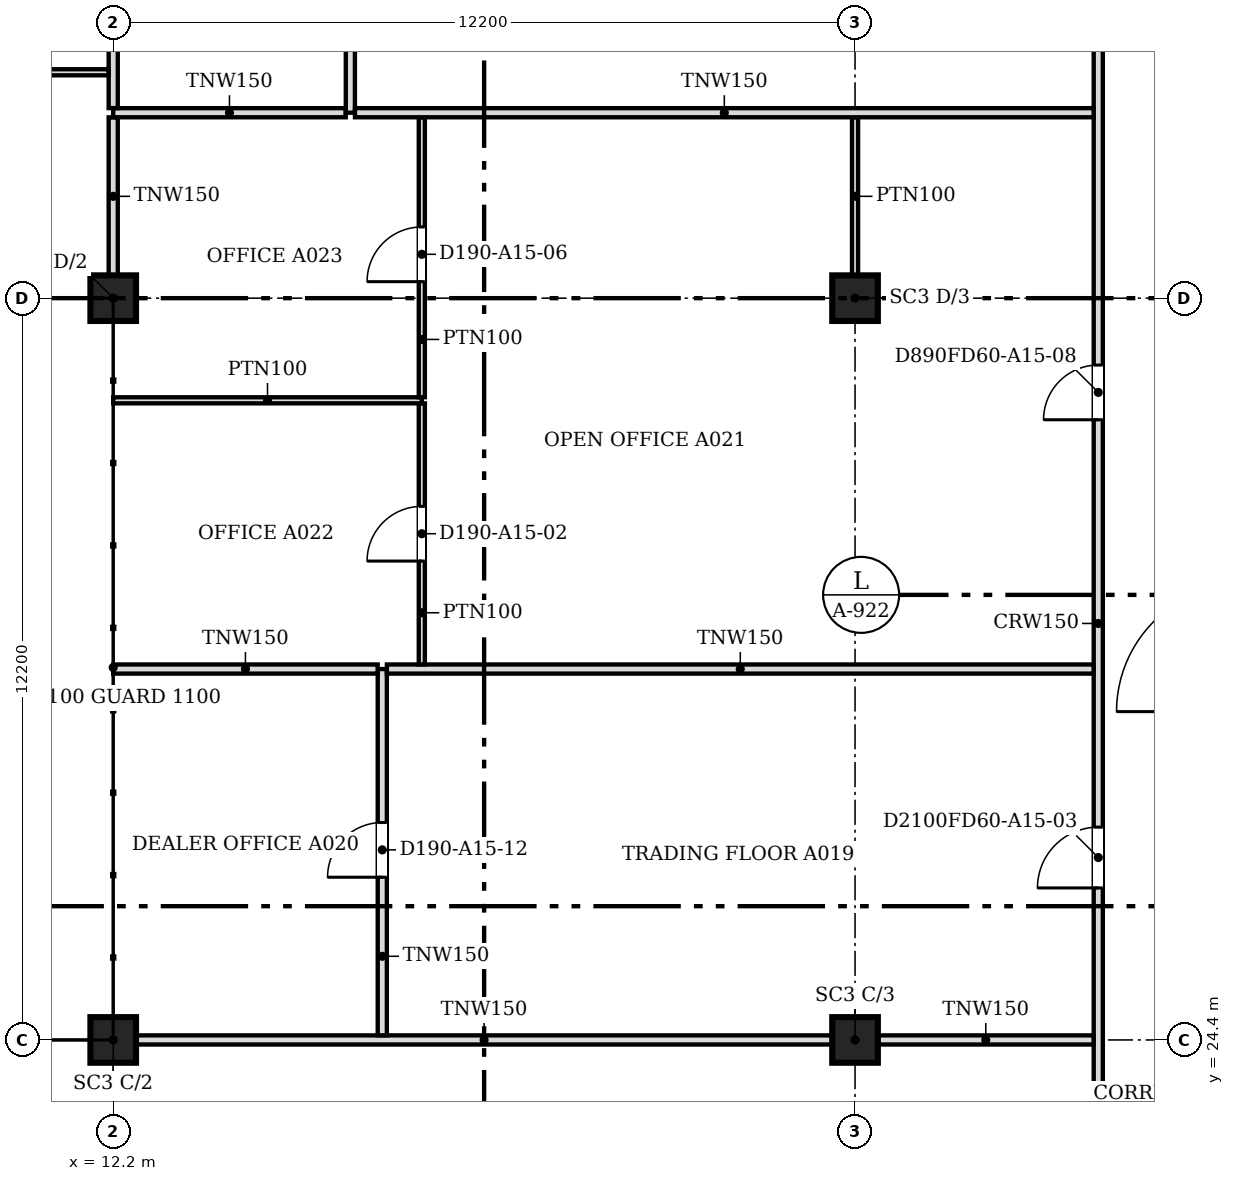
"""IFC4 building model, lengths in metres.
Left out: names, types, materials, properties, quantities, classifications, styles, units other than length and angle.
Written with IfcOpenShell. Run it as: python <this file> out.ifc"""

import sys

from ifc_helpers import new_model, si_unit, direction, frame, frame_2d, origin, origin_2d, place, context, subcontext, project, spatial, rectangle, extrude, source, transform, mapped, element, fill, save


model = new_model("IFC4")
c1 = context("Model", 3, precision=1e-05, world=origin(), true_north=direction((0.0, 1.0)))
c2 = subcontext(c1, "Body", "Model", "MODEL_VIEW")
j1 = project(units=[si_unit("LENGTHUNIT", "METRE"), si_unit("PLANEANGLEUNIT", "RADIAN")], contexts=[c1])
p1 = place(None, origin())
s1 = spatial("IfcSite", under=j1, at=p1, CompositionType="ELEMENT")
p2 = place(p1, origin())
s2 = spatial("IfcBuilding", under=s1, at=p2, CompositionType="ELEMENT")
p3 = place(p2, frame((0.0, 0.0, 166.8)))
s3 = spatial("IfcBuildingStorey", under=s2, at=p3, CompositionType="ELEMENT", Elevation=166.8)
for number, where, z_axis, x_axis in (
    (1, (12.2, 24.4, 0.0), (0.0, 0.0, 1.0), (1.0, 0.0, 0.0)),
    (2, (12.2, 36.6, 0.0), (0.0, 0.0, 1.0), (1.0, 0.0, 0.0)),
    (3, (24.4, 24.4, 0.0), (0.0, 0.0, 1.0), (1.0, 0.0, 0.0)),
    (4, (24.4, 36.6, 0.0), (0.0, 0.0, 1.0), (1.0, 0.0, 0.0)),
):
    element("IfcColumn", number, at=place(p3, frame(where, z_axis=z_axis, x_axis=x_axis)), inside=s3, PredefinedType="COLUMN", context=c2, shape_type="SweptSolid", body=[
        extrude(rectangle(XDim=0.75, YDim=0.75, at=origin_2d()), origin(), (0.0, 0.0, 1.0), 3.6),
    ])
p4 = place(p3, frame((28.4, 18.8, 0.0), z_axis=(0.0, 0.0, 1.0), x_axis=(0.0, 1.0, 0.0)))
e5 = element("IfcWall", 5, at=p4, inside=s3, PredefinedType="PARTITIONING", context=c2, shape_type="SweptSolid", body=[
    extrude(rectangle(XDim=26.824, YDim=0.15, at=frame_2d((13.412, 0.0))), origin(), (0.0, 0.0, 1.0), 3.067),
])
m1 = source(origin(), c2, "Body", "SweptSolid", [
    extrude(rectangle(XDim=0.9, YDim=2.1, at=frame_2d((0.45, 1.05))), frame((0.0, 0.085, 0.0), z_axis=(0.0, -1.0, 0.0), x_axis=(1.0, 0.0, 0.0)), (0.0, 0.0, 1.0), 0.17),
])
p5 = place(p4, frame((1.3, 0.0, 0.0)))
e6 = element("IfcOpeningElement", 6, at=p5, cuts=e5, PredefinedType="OPENING", context=c2, shape_type="MappedRepresentation", body=[
    mapped(m1, transform((0.0, 0.0, 0.0), scale=1.0)),
])
m2 = source(origin(), c2, "Body", "SweptSolid", [
    extrude(rectangle(XDim=1.0, YDim=2.1, at=frame_2d((0.5, 1.05))), frame((0.0, 0.085, 0.0), z_axis=(0.0, -1.0, 0.0), x_axis=(1.0, 0.0, 0.0)), (0.0, 0.0, 1.0), 0.17),
])
p6 = place(p4, frame((23.351, 0.0, 0.0)))
e7 = element("IfcOpeningElement", 7, at=p6, cuts=e5, PredefinedType="OPENING", context=c2, shape_type="MappedRepresentation", body=[
    mapped(m2, transform((0.0, 0.0, 0.0), scale=1.0)),
])
p7 = place(p4, frame((8.1, 0.0, 0.0)))
e8 = element("IfcOpeningElement", 8, at=p7, cuts=e5, PredefinedType="OPENING", context=c2, shape_type="MappedRepresentation", body=[
    mapped(m2, transform((0.0, 0.0, 0.0), scale=1.0)),
])
p8 = place(p4, frame((15.8, 0.0, 0.0)))
e9 = element("IfcOpeningElement", 9, at=p8, cuts=e5, PredefinedType="OPENING", context=c2, shape_type="MappedRepresentation", body=[
    mapped(m1, transform((0.0, 0.0, 0.0), scale=1.0)),
])
p9 = place(p3, frame((12.576, 24.4, 0.0), z_axis=(0.0, 0.0, 1.0), x_axis=(1.0, 0.0, 0.0)))
e10 = element("IfcWall", 10, at=p9, inside=s3, PredefinedType="PARTITIONING", context=c2, shape_type="SweptSolid", body=[
    extrude(rectangle(XDim=11.448, YDim=0.15, at=frame_2d((5.724, 0.0))), origin(), (0.0, 0.0, 1.0), 3.067),
])
p10 = place(p3, frame((24.776, 24.4, 0.0), z_axis=(0.0, 0.0, 1.0), x_axis=(1.0, 0.0, 0.0)))
e11 = element("IfcWall", 11, at=p10, inside=s3, PredefinedType="PARTITIONING", context=c2, shape_type="SweptSolid", body=[
    extrude(rectangle(XDim=3.548, YDim=0.15, at=frame_2d((1.774, 0.0))), origin(), (0.0, 0.0, 1.0), 3.067),
])
p11 = place(p3, frame((16.625, 24.476, 0.0), z_axis=(0.0, 0.0, 1.0), x_axis=(0.0, 1.0, 0.0)))
e12 = element("IfcWall", 12, at=p11, inside=s3, PredefinedType="PARTITIONING", context=c2, shape_type="SweptSolid", body=[
    extrude(rectangle(XDim=6.024, YDim=0.15, at=frame_2d((3.012, 0.0))), origin(), (0.0, 0.0, 1.0), 3.067),
])
p12 = place(p11, frame((2.6, 0.0, 0.0)))
e13 = element("IfcOpeningElement", 13, at=p12, cuts=e12, PredefinedType="OPENING", context=c2, shape_type="MappedRepresentation", body=[
    mapped(m1, transform((0.0, 0.0, 0.0), scale=1.0)),
])
p13 = place(p3, frame((12.2, 30.5, 0.0), z_axis=(0.0, 0.0, 1.0), x_axis=(1.0, 0.0, 0.0)))
e14 = element("IfcWall", 14, at=p13, inside=s3, PredefinedType="PARTITIONING", context=c2, shape_type="SweptSolid", body=[
    extrude(rectangle(XDim=4.349, YDim=0.15, at=frame_2d((2.175, 0.0))), origin(), (0.0, 0.0, 1.0), 3.067),
])
p14 = place(p3, frame((16.701, 30.5, 0.0), z_axis=(0.0, 0.0, 1.0), x_axis=(1.0, 0.0, 0.0)))
e15 = element("IfcWall", 15, at=p14, inside=s3, PredefinedType="PARTITIONING", context=c2, shape_type="SweptSolid", body=[
    extrude(rectangle(XDim=11.623, YDim=0.15, at=frame_2d((5.812, 0.0))), origin(), (0.0, 0.0, 1.0), 3.067),
])
p15 = place(p3, frame((17.275, 30.576, 0.0), z_axis=(0.0, 0.0, 1.0), x_axis=(0.0, 1.0, 0.0)))
e16 = element("IfcWall", 16, at=p15, inside=s3, PredefinedType="PARTITIONING", context=c2, shape_type="SweptSolid", body=[
    extrude(rectangle(XDim=4.293, YDim=0.1, at=frame_2d((2.147, 0.0))), origin(), (0.0, 0.0, 1.0), 3.067),
])
m3 = source(origin(), c2, "Body", "SweptSolid", [
    extrude(rectangle(XDim=0.9, YDim=2.1, at=frame_2d((0.45, 1.05))), frame((0.0, 0.06, 0.0), z_axis=(0.0, -1.0, 0.0), x_axis=(1.0, 0.0, 0.0)), (0.0, 0.0, 1.0), 0.12),
])
p16 = place(p15, frame((1.7, 0.0, 0.0)))
e17 = element("IfcOpeningElement", 17, at=p16, cuts=e16, PredefinedType="OPENING", context=c2, shape_type="MappedRepresentation", body=[
    mapped(m3, transform((0.0, 0.0, 0.0), scale=1.0)),
])
p17 = place(p3, frame((12.2, 34.92, 0.0), z_axis=(0.0, 0.0, 1.0), x_axis=(1.0, 0.0, 0.0)))
e18 = element("IfcWall", 18, at=p17, inside=s3, PredefinedType="PARTITIONING", context=c2, shape_type="SweptSolid", body=[
    extrude(rectangle(XDim=5.075, YDim=0.1, at=frame_2d((2.538, 0.0))), origin(), (0.0, 0.0, 1.0), 3.067),
])
p18 = place(p3, frame((17.275, 34.971, 0.0), z_axis=(0.0, 0.0, 1.0), x_axis=(0.0, 1.0, 0.0)))
e19 = element("IfcWall", 19, at=p18, inside=s3, PredefinedType="PARTITIONING", context=c2, shape_type="SweptSolid", body=[
    extrude(rectangle(XDim=4.603, YDim=0.1, at=frame_2d((2.301, 0.0))), origin(), (0.0, 0.0, 1.0), 3.067),
])
p19 = place(p18, frame((1.9, 0.0, 0.0)))
e20 = element("IfcOpeningElement", 20, at=p19, cuts=e19, PredefinedType="OPENING", context=c2, shape_type="MappedRepresentation", body=[
    mapped(m3, transform((0.0, 0.0, 0.0), scale=1.0)),
])
p20 = place(p3, frame((12.2, 36.976, 0.0), z_axis=(0.0, 0.0, 1.0), x_axis=(0.0, 1.0, 0.0)))
e21 = element("IfcWall", 21, at=p20, inside=s3, PredefinedType="PARTITIONING", context=c2, shape_type="SweptSolid", body=[
    extrude(rectangle(XDim=2.598, YDim=0.15, at=frame_2d((1.299, 0.0))), origin(), (0.0, 0.0, 1.0), 3.067),
])
p21 = place(p3, frame((24.4, 36.975, 0.0), z_axis=(0.0, 0.0, 1.0), x_axis=(0.0, 1.0, 0.0)))
e22 = element("IfcWall", 22, at=p21, inside=s3, PredefinedType="PARTITIONING", context=c2, shape_type="SweptSolid", body=[
    extrude(rectangle(XDim=2.6, YDim=0.1, at=frame_2d((1.3, 0.0))), origin(), (0.0, 0.0, 1.0), 3.067),
])
p22 = place(p3, frame((12.2, 39.65, 0.0), z_axis=(0.0, 0.0, 1.0), x_axis=(1.0, 0.0, 0.0)))
e23 = element("IfcWall", 23, at=p22, inside=s3, PredefinedType="PARTITIONING", context=c2, shape_type="SweptSolid", body=[
    extrude(rectangle(XDim=3.824, YDim=0.15, at=frame_2d((1.912, 0.0))), origin(), (0.0, 0.0, 1.0), 3.067),
])
p23 = place(p3, frame((16.1, 39.65, 0.0), z_axis=(0.0, 0.0, 1.0), x_axis=(0.0, 1.0, 0.0)))
e24 = element("IfcWall", 24, at=p23, inside=s3, PredefinedType="PARTITIONING", context=c2, shape_type="SweptSolid", body=[
    extrude(rectangle(XDim=5.974, YDim=0.15, at=frame_2d((2.987, 0.0))), origin(), (0.0, 0.0, 1.0), 3.067),
])
p24 = place(p23, frame((2.5, 0.0, 0.0)))
e25 = element("IfcOpeningElement", 25, at=p24, cuts=e24, PredefinedType="OPENING", context=c2, shape_type="MappedRepresentation", body=[
    mapped(m1, transform((0.0, 0.0, 0.0), scale=1.0)),
])
p25 = place(p3, frame((16.176, 39.65, 0.0), z_axis=(0.0, 0.0, 1.0), x_axis=(1.0, 0.0, 0.0)))
e26 = element("IfcWall", 26, at=p25, inside=s3, PredefinedType="PARTITIONING", context=c2, shape_type="SweptSolid", body=[
    extrude(rectangle(XDim=12.148, YDim=0.15, at=frame_2d((6.074, 0.0))), origin(), (0.0, 0.0, 1.0), 3.067),
])
p26 = place(p3, frame((12.2, 39.726, 0.0), z_axis=(0.0, 0.0, 1.0), x_axis=(0.0, 1.0, 0.0)))
e27 = element("IfcWall", 27, at=p26, inside=s3, PredefinedType="PARTITIONING", context=c2, shape_type="SweptSolid", body=[
    extrude(rectangle(XDim=5.898, YDim=0.15, at=frame_2d((2.949, 0.0))), origin(), (0.0, 0.0, 1.0), 3.067),
])
p27 = place(p3, frame((12.124, 40.315, 0.0), z_axis=(0.0, 0.0, 1.0), x_axis=(-1.0, 0.0, 0.0)))
e28 = element("IfcWall", 28, at=p27, inside=s3, PredefinedType="PARTITIONING", context=c2, shape_type="SweptSolid", body=[
    extrude(rectangle(XDim=4.624, YDim=0.1, at=frame_2d((2.312, 0.0))), origin(), (0.0, 0.0, 1.0), 3.067),
])
p28 = place(p27, frame((1.824, 0.0, 0.0)))
e29 = element("IfcOpeningElement", 29, at=p28, cuts=e28, PredefinedType="OPENING", context=c2, shape_type="MappedRepresentation", body=[
    mapped(m3, transform((0.0, 0.0, 0.0), scale=1.0)),
])
m4 = source(origin(), c2, "Body", "SweptSolid", [
    extrude(rectangle(XDim=0.9, YDim=2.1, at=frame_2d((0.45, 1.05))), frame((0.0, 0.025, 0.0), z_axis=(0.0, -1.0, 0.0), x_axis=(1.0, 0.0, 0.0)), (0.0, 0.0, 1.0), 0.05),
])
p29 = place(p16, origin())
e30 = element("IfcDoor", 30, at=p29, inside=s3, OperationType="SINGLE_SWING_LEFT", PredefinedType="DOOR", context=c2, shape_type="MappedRepresentation", body=[
    mapped(m4, transform((0.0, 0.0, 0.0), scale=1.0)),
])
fill(e17, e30)
p30 = place(p19, origin())
e31 = element("IfcDoor", 31, at=p30, inside=s3, OperationType="SINGLE_SWING_LEFT", PredefinedType="DOOR", context=c2, shape_type="MappedRepresentation", body=[
    mapped(m4, transform((0.0, 0.0, 0.0), scale=1.0)),
])
fill(e20, e31)
p31 = place(p12, origin())
e32 = element("IfcDoor", 32, at=p31, inside=s3, OperationType="SINGLE_SWING_LEFT", PredefinedType="DOOR", context=c2, shape_type="MappedRepresentation", body=[
    mapped(m4, transform((0.0, 0.0, 0.0), scale=1.0)),
])
fill(e13, e32)
m5 = source(origin(), c2, "Body", "SweptSolid", [
    extrude(rectangle(XDim=1.0, YDim=2.1, at=frame_2d((0.5, 1.05))), frame((0.0, 0.025, 0.0), z_axis=(0.0, -1.0, 0.0), x_axis=(1.0, 0.0, 0.0)), (0.0, 0.0, 1.0), 0.05),
])
p32 = place(p7, origin())
e33 = element("IfcDoor", 33, at=p32, inside=s3, OperationType="SINGLE_SWING_LEFT", PredefinedType="DOOR", context=c2, shape_type="MappedRepresentation", body=[
    mapped(m5, transform((0.0, 0.0, 0.0), scale=1.0)),
])
fill(e8, e33)
p33 = place(p8, origin())
e34 = element("IfcDoor", 34, at=p33, inside=s3, OperationType="SINGLE_SWING_LEFT", PredefinedType="DOOR", context=c2, shape_type="MappedRepresentation", body=[
    mapped(m4, transform((0.0, 0.0, 0.0), scale=1.0)),
])
fill(e9, e34)
save(model, sys.argv[1])
